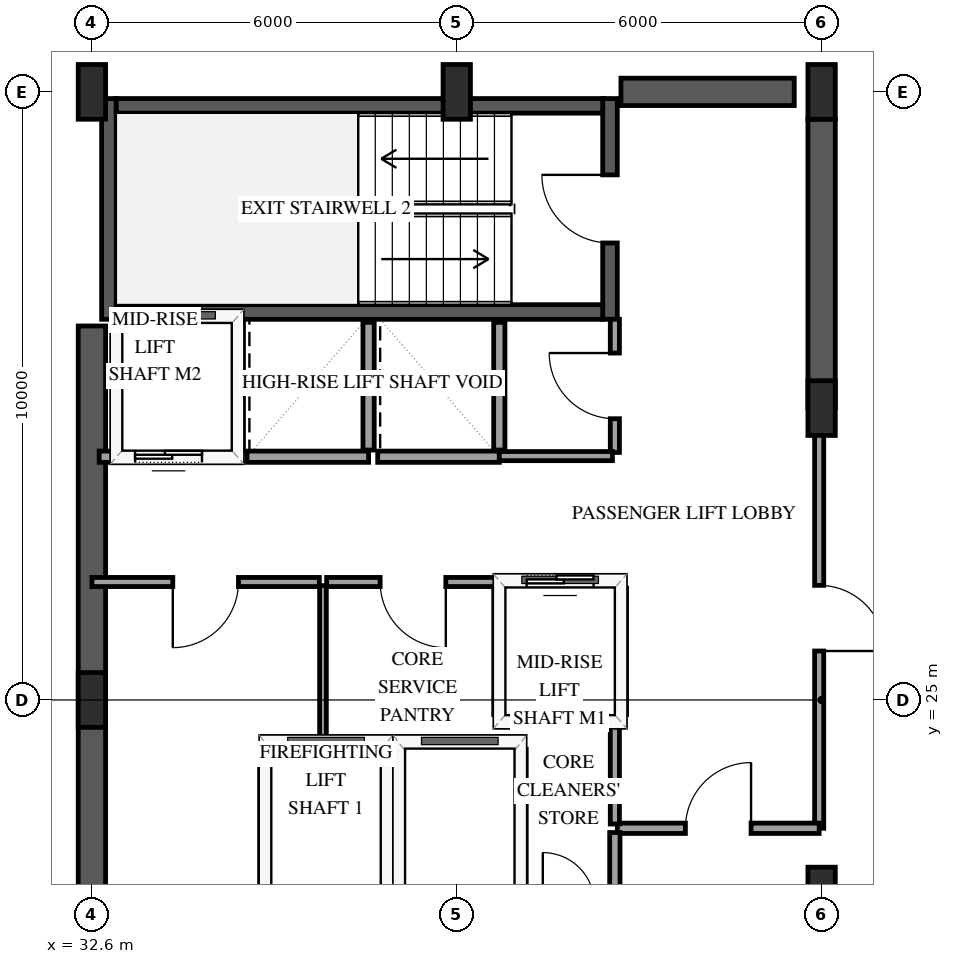
"""IFC4 building model, lengths in metres.
Left out: names, types, materials, properties, quantities, classifications, styles, units other than length and angle.
Written with IfcOpenShell. Run it as: python <this file> out.ifc"""

import sys

from ifc_helpers import new_model, si_unit, direction, frame, frame_2d, origin, origin_2d, place, context, subcontext, project, spatial, rectangle, extrude, element, fill, save


model = new_model("IFC4")
c1 = context("Model", 3, precision=1e-05, world=origin(), true_north=direction((0.0, 1.0)))
c2 = subcontext(c1, "Body", "Model", "MODEL_VIEW")
j1 = project(units=[si_unit("LENGTHUNIT", "METRE"), si_unit("PLANEANGLEUNIT", "RADIAN")], contexts=[c1])
p1 = place(None, origin())
s1 = spatial("IfcSite", under=j1, at=p1, CompositionType="ELEMENT")
p2 = place(p1, origin())
s2 = spatial("IfcBuilding", under=s1, at=p2, CompositionType="ELEMENT")
p3 = place(p2, frame((0.0, 0.0, 219.4)))
s3 = spatial("IfcBuildingStorey", under=s2, at=p3, CompositionType="ELEMENT", Elevation=219.4)
p4 = place(p3, frame((32.88, 31.26, 0.0), z_axis=(0.0, 0.0, 1.0), x_axis=(0.0, 1.0, 0.0)))
e1 = element("IfcWall", 1, at=p4, inside=s3, PredefinedType="SHEAR", context=c2, shape_type="SweptSolid", body=[
    extrude(rectangle(XDim=3.63, YDim=0.24, at=frame_2d((1.815, 0.0))), origin(), (0.0, 0.0, 1.0), 3.6),
])
p5 = place(p3, frame((41.12, 31.26, 0.0), z_axis=(0.0, 0.0, 1.0), x_axis=(0.0, 1.0, 0.0)))
e2 = element("IfcWall", 2, at=p5, inside=s3, PredefinedType="SHEAR", context=c2, shape_type="SweptSolid", body=[
    extrude(rectangle(XDim=3.63, YDim=0.24, at=frame_2d((1.815, 0.0))), origin(), (0.0, 0.0, 1.0), 3.6),
])
p6 = place(p5, frame((1.255, 0.0, 0.0)))
e3 = element("IfcOpeningElement", 3, at=p6, cuts=e2, PredefinedType="OPENING", context=c2, shape_type="SweptSolid", body=[
    extrude(rectangle(XDim=1.12, YDim=2.15, at=frame_2d((0.56, 1.075))), frame((0.0, 0.13, 0.0), z_axis=(0.0, -1.0, 0.0), x_axis=(1.0, 0.0, 0.0)), (0.0, 0.0, 1.0), 0.26),
])
for number, where, z_axis, x_axis in (
    (4, (33.0, 31.38, 0.0), (0.0, 0.0, 1.0), (1.0, 0.0, 0.0)),
    (5, (33.0, 34.77, 0.0), (0.0, 0.0, 1.0), (1.0, 0.0, 0.0)),
):
    element("IfcWall", number, at=place(p3, frame(where, z_axis=z_axis, x_axis=x_axis)), inside=s3, PredefinedType="SHEAR", context=c2, shape_type="SweptSolid", body=[
        extrude(rectangle(XDim=8.0, YDim=0.24, at=frame_2d((4.0, 0.0))), origin(), (0.0, 0.0, 1.0), 3.6),
    ])
p7 = place(p3, frame((32.6, 18.85, 0.0), z_axis=(0.0, 0.0, 1.0), x_axis=(0.0, 1.0, 0.0)))
e6 = element("IfcWall", 6, at=p7, inside=s3, PredefinedType="SHEAR", context=c2, shape_type="SweptSolid", body=[
    extrude(rectangle(XDim=12.3, YDim=0.45, at=frame_2d((6.15, 0.0))), origin(), (0.0, 0.0, 1.0), 3.6),
])
p8 = place(p3, frame((41.3, 35.0, 0.0), z_axis=(0.0, 0.0, 1.0), x_axis=(1.0, 0.0, 0.0)))
e7 = element("IfcWall", 7, at=p8, inside=s3, PredefinedType="SHEAR", context=c2, shape_type="SweptSolid", body=[
    extrude(rectangle(XDim=2.85, YDim=0.45, at=frame_2d((1.425, 0.0))), origin(), (0.0, 0.0, 1.0), 3.6),
])
p9 = place(p3, frame((44.6, 29.8, 0.0), z_axis=(0.0, 0.0, 1.0), x_axis=(0.0, 1.0, 0.0)))
e8 = element("IfcWall", 8, at=p9, inside=s3, PredefinedType="SHEAR", context=c2, shape_type="SweptSolid", body=[
    extrude(rectangle(XDim=4.75, YDim=0.45, at=frame_2d((2.375, 0.0))), origin(), (0.0, 0.0, 1.0), 3.6),
])
for number, where, z_axis, x_axis in (
    (9, (32.6, 25.0, 0.0), (0.0, 0.0, 1.0), (1.0, 0.0, 0.0)),
    (10, (32.6, 35.0, 0.0), (0.0, 0.0, 1.0), (1.0, 0.0, 0.0)),
    (11, (38.6, 35.0, 0.0), (0.0, 0.0, 1.0), (1.0, 0.0, 0.0)),
    (12, (44.6, 21.8, 0.0), (0.0, 0.0, 1.0), (1.0, 0.0, 0.0)),
    (13, (44.6, 29.8, 0.0), (0.0, 0.0, 1.0), (1.0, 0.0, 0.0)),
    (14, (44.6, 35.0, 0.0), (0.0, 0.0, 1.0), (1.0, 0.0, 0.0)),
):
    element("IfcColumn", number, at=place(p3, frame(where, z_axis=z_axis, x_axis=x_axis)), inside=s3, PredefinedType="PILASTER", context=c2, shape_type="SweptSolid", body=[
        extrude(rectangle(XDim=0.45, YDim=0.9, at=origin_2d()), origin(), (0.0, 0.0, 1.0), 3.6),
    ])
p10 = place(p3, frame((35.45, 24.3, 0.0), z_axis=(0.0, 0.0, 1.0), x_axis=(1.0, 0.0, 0.0)))
e15 = element("IfcWall", 15, at=p10, inside=s3, PredefinedType="SOLIDWALL", context=c2, shape_type="SweptSolid", body=[
    extrude(rectangle(XDim=2.0, YDim=0.185, at=frame_2d((1.0, 0.0))), origin(), (0.0, 0.0, 1.0), 3.3),
])
for number, where, z_axis, x_axis in (
    (16, (35.45, 21.81, 0.0), (0.0, 0.0, 1.0), (0.0, 1.0, 0.0)),
    (17, (37.45, 21.81, 0.0), (0.0, 0.0, 1.0), (0.0, 1.0, 0.0)),
):
    element("IfcWall", number, at=place(p3, frame(where, z_axis=z_axis, x_axis=x_axis)), inside=s3, PredefinedType="SOLIDWALL", context=c2, shape_type="SweptSolid", body=[
        extrude(rectangle(XDim=2.38, YDim=0.185, at=frame_2d((1.19, 0.0))), origin(), (0.0, 0.0, 1.0), 3.3),
    ])
p11 = place(p3, frame((37.65, 24.3, 0.0), z_axis=(0.0, 0.0, 1.0), x_axis=(1.0, 0.0, 0.0)))
e18 = element("IfcWall", 18, at=p11, inside=s3, PredefinedType="SOLIDWALL", context=c2, shape_type="SweptSolid", body=[
    extrude(rectangle(XDim=2.0, YDim=0.185, at=frame_2d((1.0, 0.0))), origin(), (0.0, 0.0, 1.0), 3.3),
])
p12 = place(p3, frame((39.65, 21.81, 0.0), z_axis=(0.0, 0.0, 1.0), x_axis=(0.0, 1.0, 0.0)))
e19 = element("IfcWall", 19, at=p12, inside=s3, PredefinedType="SOLIDWALL", context=c2, shape_type="SweptSolid", body=[
    extrude(rectangle(XDim=2.38, YDim=0.185, at=frame_2d((1.19, 0.0))), origin(), (0.0, 0.0, 1.0), 3.3),
])
p13 = place(p3, frame((39.3, 24.65, 0.0), z_axis=(0.0, 0.0, 1.0), x_axis=(1.0, 0.0, 0.0)))
e20 = element("IfcWall", 20, at=p13, inside=s3, PredefinedType="SOLIDWALL", context=c2, shape_type="SweptSolid", body=[
    extrude(rectangle(XDim=2.0, YDim=0.185, at=frame_2d((1.0, 0.0))), origin(), (0.0, 0.0, 1.0), 3.3),
])
p14 = place(p3, frame((39.3, 26.95, 0.0), z_axis=(0.0, 0.0, 1.0), x_axis=(1.0, 0.0, 0.0)))
e21 = element("IfcWall", 21, at=p14, inside=s3, PredefinedType="SOLIDWALL", context=c2, shape_type="SweptSolid", body=[
    extrude(rectangle(XDim=2.0, YDim=0.185, at=frame_2d((1.0, 0.0))), origin(), (0.0, 0.0, 1.0), 3.3),
])
p15 = place(p14, frame((0.45, 0.0, 0.0)))
e22 = element("IfcOpeningElement", 22, at=p15, cuts=e21, PredefinedType="OPENING", context=c2, shape_type="SweptSolid", body=[
    extrude(rectangle(XDim=1.1, YDim=2.15, at=frame_2d((0.55, 1.075))), frame((0.0, 0.103, 0.0), z_axis=(0.0, -1.0, 0.0), x_axis=(1.0, 0.0, 0.0)), (0.0, 0.0, 1.0), 0.205),
])
for number, where, z_axis, x_axis in (
    (23, (39.3, 24.76, 0.0), (0.0, 0.0, 1.0), (0.0, 1.0, 0.0)),
    (24, (41.3, 24.76, 0.0), (0.0, 0.0, 1.0), (0.0, 1.0, 0.0)),
):
    element("IfcWall", number, at=place(p3, frame(where, z_axis=z_axis, x_axis=x_axis)), inside=s3, PredefinedType="SOLIDWALL", context=c2, shape_type="SweptSolid", body=[
        extrude(rectangle(XDim=2.08, YDim=0.185, at=frame_2d((1.04, 0.0))), origin(), (0.0, 0.0, 1.0), 3.3),
    ])
p16 = place(p3, frame((32.72, 29.0, 0.0), z_axis=(0.0, 0.0, 1.0), x_axis=(1.0, 0.0, 0.0)))
e25 = element("IfcWall", 25, at=p16, inside=s3, PredefinedType="SOLIDWALL", context=c2, shape_type="SweptSolid", body=[
    extrude(rectangle(XDim=2.28, YDim=0.185, at=frame_2d((1.14, 0.0))), origin(), (0.0, 0.0, 1.0), 3.3),
])
p17 = place(p16, frame((0.59, 0.0, 0.0)))
e26 = element("IfcOpeningElement", 26, at=p17, cuts=e25, PredefinedType="OPENING", context=c2, shape_type="SweptSolid", body=[
    extrude(rectangle(XDim=1.1, YDim=2.15, at=frame_2d((0.55, 1.075))), frame((0.0, 0.103, 0.0), z_axis=(0.0, -1.0, 0.0), x_axis=(1.0, 0.0, 0.0)), (0.0, 0.0, 1.0), 0.205),
])
p18 = place(p3, frame((35.0, 29.11, 0.0), z_axis=(0.0, 0.0, 1.0), x_axis=(0.0, 1.0, 0.0)))
e27 = element("IfcWall", 27, at=p18, inside=s3, PredefinedType="SOLIDWALL", context=c2, shape_type="SweptSolid", body=[
    extrude(rectangle(XDim=2.1, YDim=0.185, at=frame_2d((1.05, 0.0))), origin(), (0.0, 0.0, 1.0), 3.3),
])
p19 = place(p3, frame((35.15, 29.0, 0.0), z_axis=(0.0, 0.0, 1.0), x_axis=(1.0, 0.0, 0.0)))
e28 = element("IfcWall", 28, at=p19, inside=s3, PredefinedType="SOLIDWALL", context=c2, shape_type="SweptSolid", body=[
    extrude(rectangle(XDim=2.0, YDim=0.185, at=frame_2d((1.0, 0.0))), origin(), (0.0, 0.0, 1.0), 3.3),
])
p20 = place(p3, frame((37.15, 29.11, 0.0), z_axis=(0.0, 0.0, 1.0), x_axis=(0.0, 1.0, 0.0)))
e29 = element("IfcWall", 29, at=p20, inside=s3, PredefinedType="SOLIDWALL", context=c2, shape_type="SweptSolid", body=[
    extrude(rectangle(XDim=2.1, YDim=0.185, at=frame_2d((1.05, 0.0))), origin(), (0.0, 0.0, 1.0), 3.3),
])
p21 = place(p3, frame((37.3, 29.0, 0.0), z_axis=(0.0, 0.0, 1.0), x_axis=(1.0, 0.0, 0.0)))
e30 = element("IfcWall", 30, at=p21, inside=s3, PredefinedType="SOLIDWALL", context=c2, shape_type="SweptSolid", body=[
    extrude(rectangle(XDim=2.0, YDim=0.185, at=frame_2d((1.0, 0.0))), origin(), (0.0, 0.0, 1.0), 3.3),
])
p22 = place(p3, frame((39.3, 29.11, 0.0), z_axis=(0.0, 0.0, 1.0), x_axis=(0.0, 1.0, 0.0)))
e31 = element("IfcWall", 31, at=p22, inside=s3, PredefinedType="SOLIDWALL", context=c2, shape_type="SweptSolid", body=[
    extrude(rectangle(XDim=2.1, YDim=0.185, at=frame_2d((1.05, 0.0))), origin(), (0.0, 0.0, 1.0), 3.3),
])
p23 = place(p3, frame((44.56, 29.8, 0.0), z_axis=(0.0, 0.0, 1.0), x_axis=(0.0, -1.0, 0.0)))
e32 = element("IfcWall", 32, at=p23, inside=s3, PredefinedType="PARTITIONING", context=c2, shape_type="SweptSolid", body=[
    extrude(rectangle(XDim=6.91, YDim=0.15, at=frame_2d((3.455, 0.0))), origin(), (0.0, 0.0, 1.0), 2.34),
])
p24 = place(p23, frame((2.915, 0.0, 0.0)))
e33 = element("IfcOpeningElement", 33, at=p24, cuts=e32, PredefinedType="OPENING", context=c2, shape_type="SweptSolid", body=[
    extrude(rectangle(XDim=1.08, YDim=2.15, at=frame_2d((0.54, 1.075))), frame((0.0, 0.085, 0.0), z_axis=(0.0, -1.0, 0.0), x_axis=(1.0, 0.0, 0.0)), (0.0, 0.0, 1.0), 0.17),
])
p25 = place(p3, frame((36.34, 26.94, 0.0), z_axis=(0.0, 0.0, 1.0), x_axis=(-1.0, 0.0, 0.0)))
e34 = element("IfcWall", 34, at=p25, inside=s3, PredefinedType="PARTITIONING", context=c2, shape_type="SweptSolid", body=[
    extrude(rectangle(XDim=3.74, YDim=0.15, at=frame_2d((1.87, 0.0))), origin(), (0.0, 0.0, 1.0), 3.3),
])
p26 = place(p25, frame((1.33, 0.0, 0.0)))
e35 = element("IfcOpeningElement", 35, at=p26, cuts=e34, PredefinedType="OPENING", context=c2, shape_type="SweptSolid", body=[
    extrude(rectangle(XDim=1.08, YDim=2.15, at=frame_2d((0.54, 1.075))), frame((0.0, 0.085, 0.0), z_axis=(0.0, -1.0, 0.0), x_axis=(1.0, 0.0, 0.0)), (0.0, 0.0, 1.0), 0.17),
])
p27 = place(p3, frame((41.24, 22.89, 0.0), z_axis=(0.0, 0.0, 1.0), x_axis=(1.0, 0.0, 0.0)))
e36 = element("IfcWall", 36, at=p27, inside=s3, PredefinedType="PARTITIONING", context=c2, shape_type="SweptSolid", body=[
    extrude(rectangle(XDim=3.32, YDim=0.17, at=frame_2d((1.66, 0.0))), origin(), (0.0, 0.0, 1.0), 3.3),
])
p28 = place(p27, frame((1.12, 0.0, 0.0)))
e37 = element("IfcOpeningElement", 37, at=p28, cuts=e36, PredefinedType="OPENING", context=c2, shape_type="SweptSolid", body=[
    extrude(rectangle(XDim=1.08, YDim=2.15, at=frame_2d((0.54, 1.075))), frame((0.0, 0.095, 0.0), z_axis=(0.0, -1.0, 0.0), x_axis=(1.0, 0.0, 0.0)), (0.0, 0.0, 1.0), 0.19),
])
p29 = place(p3, frame((39.3, 26.94, 0.0), z_axis=(0.0, 0.0, 1.0), x_axis=(-1.0, 0.0, 0.0)))
e38 = element("IfcWall", 38, at=p29, inside=s3, PredefinedType="PARTITIONING", context=c2, shape_type="SweptSolid", body=[
    extrude(rectangle(XDim=2.84, YDim=0.15, at=frame_2d((1.42, 0.0))), origin(), (0.0, 0.0, 1.0), 3.3),
])
p30 = place(p29, frame((0.88, 0.0, 0.0)))
e39 = element("IfcOpeningElement", 39, at=p30, cuts=e38, PredefinedType="OPENING", context=c2, shape_type="SweptSolid", body=[
    extrude(rectangle(XDim=1.08, YDim=2.15, at=frame_2d((0.54, 1.075))), frame((0.0, 0.085, 0.0), z_axis=(0.0, -1.0, 0.0), x_axis=(1.0, 0.0, 0.0)), (0.0, 0.0, 1.0), 0.17),
])
p31 = place(p3, frame((36.4, 26.88, 0.0), z_axis=(0.0, 0.0, 1.0), x_axis=(0.0, -1.0, 0.0)))
e40 = element("IfcWall", 40, at=p31, inside=s3, PredefinedType="PARTITIONING", context=c2, shape_type="SweptSolid", body=[
    extrude(rectangle(XDim=2.58, YDim=0.11, at=frame_2d((1.29, 0.0))), origin(), (0.0, 0.0, 1.0), 3.3),
])
p32 = place(p3, frame((41.2, 29.07, 0.0), z_axis=(0.0, 0.0, 1.0), x_axis=(0.0, 1.0, 0.0)))
e41 = element("IfcWall", 41, at=p32, inside=s3, PredefinedType="PARTITIONING", context=c2, shape_type="SweptSolid", body=[
    extrude(rectangle(XDim=2.19, YDim=0.15, at=frame_2d((1.095, 0.0))), origin(), (0.0, 0.0, 1.0), 3.3),
])
p33 = place(p32, frame((0.555, 0.0, 0.0)))
e42 = element("IfcOpeningElement", 42, at=p33, cuts=e41, PredefinedType="OPENING", context=c2, shape_type="SweptSolid", body=[
    extrude(rectangle(XDim=1.08, YDim=2.15, at=frame_2d((0.54, 1.075))), frame((0.0, 0.085, 0.0), z_axis=(0.0, -1.0, 0.0), x_axis=(1.0, 0.0, 0.0)), (0.0, 0.0, 1.0), 0.17),
])
p34 = place(p3, frame((39.3, 29.01, 0.0), z_axis=(0.0, 0.0, 1.0), x_axis=(1.0, 0.0, 0.0)))
e43 = element("IfcWall", 43, at=p34, inside=s3, PredefinedType="PARTITIONING", context=c2, shape_type="SweptSolid", body=[
    extrude(rectangle(XDim=1.86, YDim=0.15, at=frame_2d((0.93, 0.0))), origin(), (0.0, 0.0, 1.0), 3.3),
])
p35 = place(p3, frame((41.2, 22.96, 0.0), z_axis=(0.0, 0.0, 1.0), x_axis=(0.0, 1.0, 0.0)))
e44 = element("IfcWall", 44, at=p35, inside=s3, PredefinedType="PARTITIONING", context=c2, shape_type="SweptSolid", body=[
    extrude(rectangle(XDim=1.69, YDim=0.15, at=frame_2d((0.845, 0.0))), origin(), (0.0, 0.0, 1.0), 3.3),
])
p36 = place(p3, frame((41.2, 21.7, 0.0), z_axis=(0.0, 0.0, 1.0), x_axis=(0.0, 1.0, 0.0)))
e45 = element("IfcWall", 45, at=p36, inside=s3, PredefinedType="PARTITIONING", context=c2, shape_type="SweptSolid", body=[
    extrude(rectangle(XDim=1.12, YDim=0.17, at=frame_2d((0.56, 0.0))), origin(), (0.0, 0.0, 1.0), 3.3),
])
p37 = place(p15, origin())
e46 = element("IfcDoor", 46, at=p37, inside=s3, OperationType="SLIDING_TO_LEFT", PredefinedType="DOOR", context=c2, shape_type="SweptSolid", body=[
    extrude(rectangle(XDim=1.1, YDim=2.15, at=frame_2d((0.55, 1.075))), frame((0.0, 0.025, 0.0), z_axis=(0.0, -1.0, 0.0), x_axis=(1.0, 0.0, 0.0)), (0.0, 0.0, 1.0), 0.05),
])
fill(e22, e46)
p38 = place(p17, origin())
e47 = element("IfcDoor", 47, at=p38, inside=s3, OperationType="SLIDING_TO_LEFT", PredefinedType="DOOR", context=c2, shape_type="SweptSolid", body=[
    extrude(rectangle(XDim=1.1, YDim=2.15, at=frame_2d((0.55, 1.075))), frame((0.0, 0.025, 0.0), z_axis=(0.0, -1.0, 0.0), x_axis=(1.0, 0.0, 0.0)), (0.0, 0.0, 1.0), 0.05),
])
fill(e26, e47)
p39 = place(p6, origin())
e48 = element("IfcDoor", 48, at=p39, inside=s3, OperationType="SINGLE_SWING_RIGHT", PredefinedType="DOOR", context=c2, shape_type="SweptSolid", body=[
    extrude(rectangle(XDim=1.12, YDim=2.15, at=frame_2d((0.56, 1.075))), frame((0.0, 0.025, 0.0), z_axis=(0.0, -1.0, 0.0), x_axis=(1.0, 0.0, 0.0)), (0.0, 0.0, 1.0), 0.05),
])
fill(e3, e48)
p40 = place(p24, origin())
e49 = element("IfcDoor", 49, at=p40, inside=s3, OperationType="SINGLE_SWING_RIGHT", PredefinedType="DOOR", context=c2, shape_type="SweptSolid", body=[
    extrude(rectangle(XDim=1.08, YDim=2.15, at=frame_2d((0.54, 1.075))), frame((0.0, 0.025, 0.0), z_axis=(0.0, -1.0, 0.0), x_axis=(1.0, 0.0, 0.0)), (0.0, 0.0, 1.0), 0.05),
])
fill(e33, e49)
p41 = place(p26, origin())
e50 = element("IfcDoor", 50, at=p41, inside=s3, OperationType="SINGLE_SWING_RIGHT", PredefinedType="DOOR", context=c2, shape_type="SweptSolid", body=[
    extrude(rectangle(XDim=1.08, YDim=2.15, at=frame_2d((0.54, 1.075))), frame((0.0, 0.025, 0.0), z_axis=(0.0, -1.0, 0.0), x_axis=(1.0, 0.0, 0.0)), (0.0, 0.0, 1.0), 0.05),
])
fill(e35, e50)
p42 = place(p28, origin())
e51 = element("IfcDoor", 51, at=p42, inside=s3, OperationType="SINGLE_SWING_RIGHT", PredefinedType="DOOR", context=c2, shape_type="SweptSolid", body=[
    extrude(rectangle(XDim=1.08, YDim=2.15, at=frame_2d((0.54, 1.075))), frame((0.0, 0.025, 0.0), z_axis=(0.0, -1.0, 0.0), x_axis=(1.0, 0.0, 0.0)), (0.0, 0.0, 1.0), 0.05),
])
fill(e37, e51)
p43 = place(p30, origin())
e52 = element("IfcDoor", 52, at=p43, inside=s3, OperationType="SINGLE_SWING_LEFT", PredefinedType="DOOR", context=c2, shape_type="SweptSolid", body=[
    extrude(rectangle(XDim=1.08, YDim=2.15, at=frame_2d((0.54, 1.075))), frame((0.0, 0.025, 0.0), z_axis=(0.0, -1.0, 0.0), x_axis=(1.0, 0.0, 0.0)), (0.0, 0.0, 1.0), 0.05),
])
fill(e39, e52)
p44 = place(p33, origin())
e53 = element("IfcDoor", 53, at=p44, inside=s3, OperationType="SINGLE_SWING_RIGHT", PredefinedType="DOOR", context=c2, shape_type="SweptSolid", body=[
    extrude(rectangle(XDim=1.08, YDim=2.15, at=frame_2d((0.54, 1.075))), frame((0.0, 0.025, 0.0), z_axis=(0.0, -1.0, 0.0), x_axis=(1.0, 0.0, 0.0)), (0.0, 0.0, 1.0), 0.05),
])
fill(e42, e53)
save(model, sys.argv[1])
